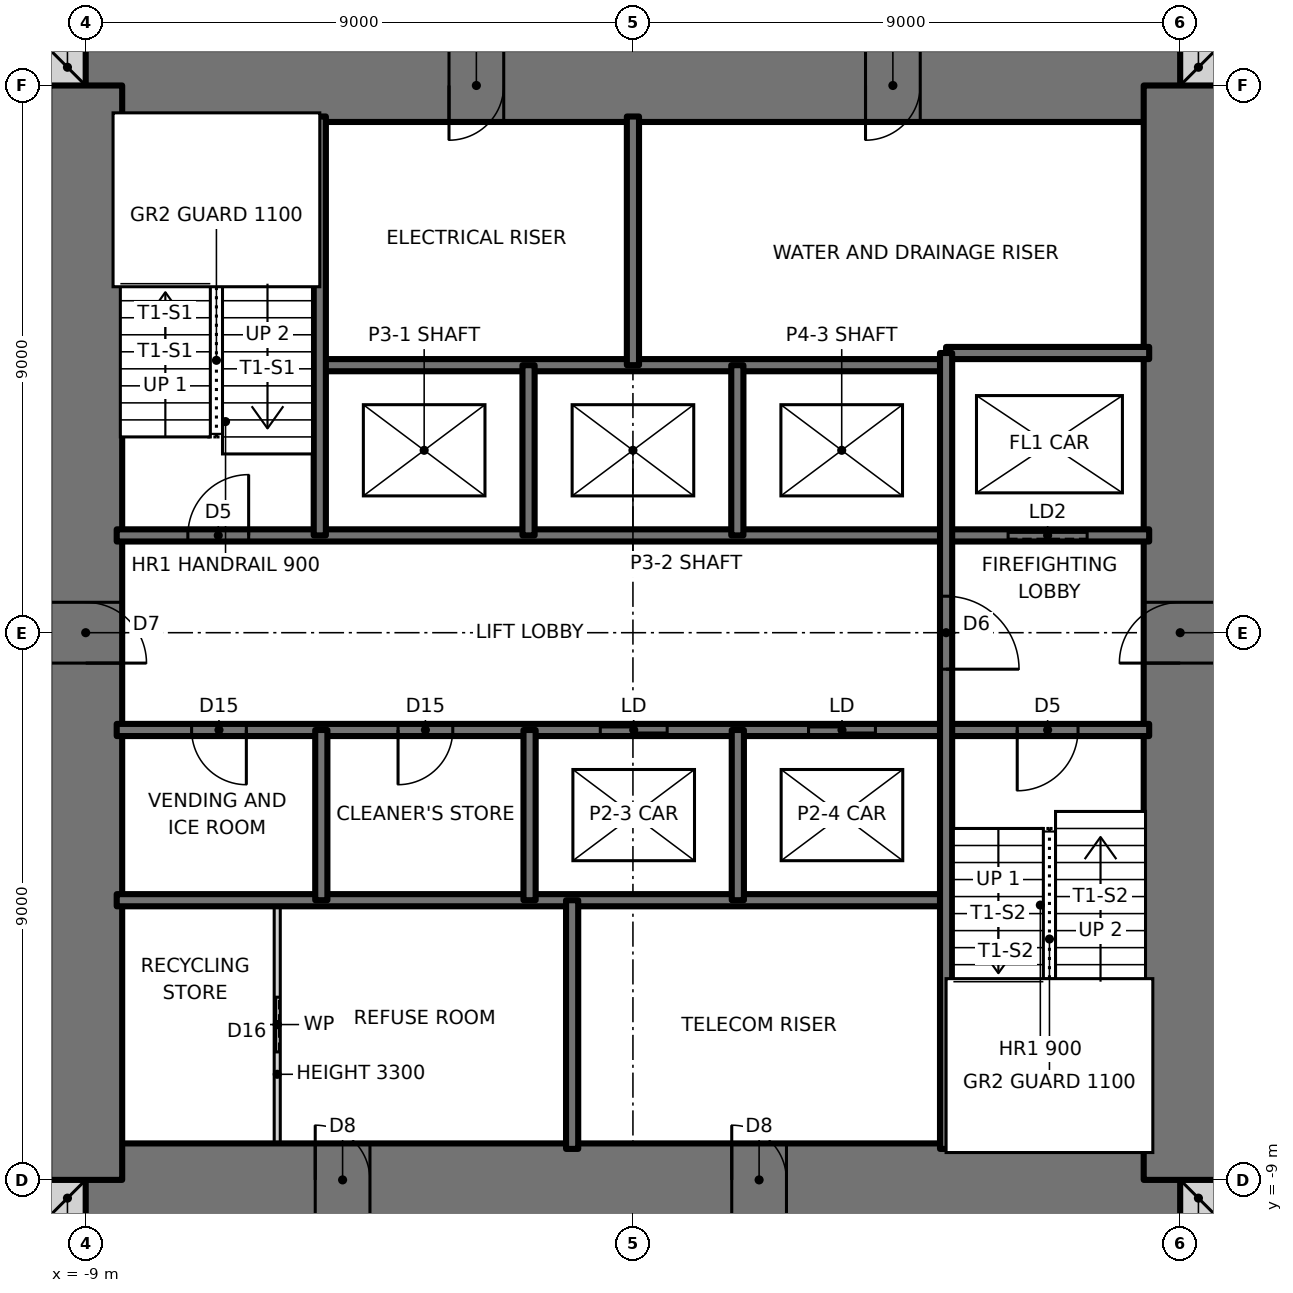
"""IFC4 building model, lengths in metres.
Left out: names, types, materials, properties, quantities, classifications, styles, units other than length and angle.
Written with IfcOpenShell. Run it as: python <this file> out.ifc"""

import sys

from ifc_helpers import new_model, si_unit, direction, frame, frame_2d, origin, place, context, subcontext, project, spatial, rectangle, extrude, element, fill, save


model = new_model("IFC4")
c1 = context("Model", 3, precision=1e-05, world=origin(), true_north=direction((0.0, 1.0)))
c2 = subcontext(c1, "Body", "Model", "MODEL_VIEW")
j1 = project(units=[si_unit("LENGTHUNIT", "METRE"), si_unit("PLANEANGLEUNIT", "RADIAN")], contexts=[c1])
p1 = place(None, origin())
s1 = spatial("IfcSite", under=j1, at=p1, CompositionType="ELEMENT")
p2 = place(p1, origin())
s2 = spatial("IfcBuilding", under=s1, at=p2, CompositionType="ELEMENT")
p3 = place(p2, frame((0.0, 0.0, 140.0)))
s3 = spatial("IfcBuildingStorey", under=s2, at=p3, CompositionType="ELEMENT", Elevation=140.0)
for number, where, z_axis, x_axis in (
    (1, (-9.6, -9.3, 0.0), (0.0, 0.0, 1.0), (1.0, 0.0, 0.0)),
    (2, (9.0, -9.3, 0.0), (0.0, 0.0, 1.0), (1.0, 0.0, 0.0)),
    (3, (9.0, 9.3, 0.0), (0.0, 0.0, 1.0), (1.0, 0.0, 0.0)),
    (4, (-9.6, 9.3, 0.0), (0.0, 0.0, 1.0), (1.0, 0.0, 0.0)),
):
    element("IfcWall", number, at=place(p3, frame(where, z_axis=z_axis, x_axis=x_axis)), inside=s3, PredefinedType="SOLIDWALL", context=c2, shape_type="SweptSolid", body=[
        extrude(rectangle(XDim=0.6, YDim=0.6, at=frame_2d((0.3, 0.0))), origin(), (0.0, 0.0, 1.0), 3.5),
    ])
p4 = place(p3, frame((-9.0, -9.0, 0.0), z_axis=(0.0, 0.0, 1.0), x_axis=(1.0, 0.0, 0.0)))
e5 = element("IfcWall", 5, at=p4, inside=s3, PredefinedType="SHEAR", context=c2, shape_type="SweptSolid", body=[
    extrude(rectangle(XDim=18.0, YDim=1.2, at=frame_2d((9.0, 0.0))), origin(), (0.0, 0.0, 1.0), 3.5),
])
p5 = place(p4, frame((3.775, 0.0, 0.0)))
e6 = element("IfcOpeningElement", 6, at=p5, cuts=e5, PredefinedType="OPENING", context=c2, shape_type="SweptSolid", body=[
    extrude(rectangle(XDim=0.9, YDim=2.1, at=frame_2d((0.45, 1.05))), frame((0.0, 0.61, 0.0), z_axis=(0.0, -1.0, 0.0), x_axis=(1.0, 0.0, 0.0)), (0.0, 0.0, 1.0), 1.22),
])
p6 = place(p4, frame((10.625, 0.0, 0.0)))
e7 = element("IfcOpeningElement", 7, at=p6, cuts=e5, PredefinedType="OPENING", context=c2, shape_type="SweptSolid", body=[
    extrude(rectangle(XDim=0.9, YDim=2.1, at=frame_2d((0.45, 1.05))), frame((0.0, 0.61, 0.0), z_axis=(0.0, -1.0, 0.0), x_axis=(1.0, 0.0, 0.0)), (0.0, 0.0, 1.0), 1.22),
])
p7 = place(p3, frame((9.0, 9.0, 0.0), z_axis=(0.0, 0.0, 1.0), x_axis=(-1.0, 0.0, 0.0)))
e8 = element("IfcWall", 8, at=p7, inside=s3, PredefinedType="SHEAR", context=c2, shape_type="SweptSolid", body=[
    extrude(rectangle(XDim=18.0, YDim=1.2, at=frame_2d((9.0, 0.0))), origin(), (0.0, 0.0, 1.0), 3.5),
])
p8 = place(p7, frame((11.125, 0.0, 0.0)))
e9 = element("IfcOpeningElement", 9, at=p8, cuts=e8, PredefinedType="OPENING", context=c2, shape_type="SweptSolid", body=[
    extrude(rectangle(XDim=0.9, YDim=2.1, at=frame_2d((0.45, 1.05))), frame((0.0, 0.61, 0.0), z_axis=(0.0, -1.0, 0.0), x_axis=(1.0, 0.0, 0.0)), (0.0, 0.0, 1.0), 1.22),
])
p9 = place(p7, frame((4.275, 0.0, 0.0)))
e10 = element("IfcOpeningElement", 10, at=p9, cuts=e8, PredefinedType="OPENING", context=c2, shape_type="SweptSolid", body=[
    extrude(rectangle(XDim=0.9, YDim=2.1, at=frame_2d((0.45, 1.05))), frame((0.0, 0.61, 0.0), z_axis=(0.0, -1.0, 0.0), x_axis=(1.0, 0.0, 0.0)), (0.0, 0.0, 1.0), 1.22),
])
p10 = place(p3, frame((9.0, -9.0, 0.0), z_axis=(0.0, 0.0, 1.0), x_axis=(0.0, 1.0, 0.0)))
e11 = element("IfcWall", 11, at=p10, inside=s3, PredefinedType="SHEAR", context=c2, shape_type="SweptSolid", body=[
    extrude(rectangle(XDim=18.0, YDim=1.2, at=frame_2d((9.0, 0.0))), origin(), (0.0, 0.0, 1.0), 3.5),
])
p11 = place(p10, frame((8.5, 0.0, 0.0)))
e12 = element("IfcOpeningElement", 12, at=p11, cuts=e11, PredefinedType="OPENING", context=c2, shape_type="SweptSolid", body=[
    extrude(rectangle(XDim=1.0, YDim=2.1, at=frame_2d((0.5, 1.05))), frame((0.0, 0.61, 0.0), z_axis=(0.0, -1.0, 0.0), x_axis=(1.0, 0.0, 0.0)), (0.0, 0.0, 1.0), 1.22),
])
p12 = place(p3, frame((-9.0, 9.0, 0.0), z_axis=(0.0, 0.0, 1.0), x_axis=(0.0, -1.0, 0.0)))
e13 = element("IfcWall", 13, at=p12, inside=s3, PredefinedType="SHEAR", context=c2, shape_type="SweptSolid", body=[
    extrude(rectangle(XDim=18.0, YDim=1.2, at=frame_2d((9.0, 0.0))), origin(), (0.0, 0.0, 1.0), 3.5),
])
p13 = place(p12, frame((8.5, 0.0, 0.0)))
e14 = element("IfcOpeningElement", 14, at=p13, cuts=e13, PredefinedType="OPENING", context=c2, shape_type="SweptSolid", body=[
    extrude(rectangle(XDim=1.0, YDim=2.1, at=frame_2d((0.5, 1.05))), frame((0.0, 0.61, 0.0), z_axis=(0.0, -1.0, 0.0), x_axis=(1.0, 0.0, 0.0)), (0.0, 0.0, 1.0), 1.22),
])
p14 = place(p3, frame((-8.49, -4.4, 0.0), z_axis=(0.0, 0.0, 1.0), x_axis=(1.0, 0.0, 0.0)))
e15 = element("IfcWall", 15, at=p14, inside=s3, PredefinedType="SOLIDWALL", context=c2, shape_type="SweptSolid", body=[
    extrude(rectangle(XDim=13.64, YDim=0.2, at=frame_2d((6.82, 0.0))), origin(), (0.0, 0.0, 1.0), 3.5),
])
p15 = place(p3, frame((-8.49, -1.6, 0.0), z_axis=(0.0, 0.0, 1.0), x_axis=(1.0, 0.0, 0.0)))
e16 = element("IfcWall", 16, at=p15, inside=s3, PredefinedType="SOLIDWALL", context=c2, shape_type="SweptSolid", body=[
    extrude(rectangle(XDim=16.98, YDim=0.2, at=frame_2d((8.49, 0.0))), origin(), (0.0, 0.0, 1.0), 3.5),
])
p16 = place(p15, frame((14.81, 0.0, 0.0)))
e17 = element("IfcOpeningElement", 17, at=p16, cuts=e16, PredefinedType="OPENING", context=c2, shape_type="SweptSolid", body=[
    extrude(rectangle(XDim=1.0, YDim=2.1, at=frame_2d((0.5, 1.05))), frame((0.0, 0.11, 0.0), z_axis=(0.0, -1.0, 0.0), x_axis=(1.0, 0.0, 0.0)), (0.0, 0.0, 1.0), 0.22),
])
p17 = place(p15, frame((1.232, 0.0, 0.0)))
e18 = element("IfcOpeningElement", 18, at=p17, cuts=e16, PredefinedType="OPENING", context=c2, shape_type="SweptSolid", body=[
    extrude(rectangle(XDim=0.9, YDim=2.1, at=frame_2d((0.45, 1.05))), frame((0.0, 0.11, 0.0), z_axis=(0.0, -1.0, 0.0), x_axis=(1.0, 0.0, 0.0)), (0.0, 0.0, 1.0), 0.22),
])
p18 = place(p15, frame((4.627, 0.0, 0.0)))
e19 = element("IfcOpeningElement", 19, at=p18, cuts=e16, PredefinedType="OPENING", context=c2, shape_type="SweptSolid", body=[
    extrude(rectangle(XDim=0.9, YDim=2.1, at=frame_2d((0.45, 1.05))), frame((0.0, 0.11, 0.0), z_axis=(0.0, -1.0, 0.0), x_axis=(1.0, 0.0, 0.0)), (0.0, 0.0, 1.0), 0.22),
])
p19 = place(p15, frame((7.953, 0.0, 0.0)))
e20 = element("IfcOpeningElement", 20, at=p19, cuts=e16, PredefinedType="OPENING", context=c2, shape_type="SweptSolid", body=[
    extrude(rectangle(XDim=1.1, YDim=2.1, at=frame_2d((0.55, 1.05))), frame((0.0, 0.11, 0.0), z_axis=(0.0, -1.0, 0.0), x_axis=(1.0, 0.0, 0.0)), (0.0, 0.0, 1.0), 0.22),
])
p20 = place(p15, frame((11.378, 0.0, 0.0)))
e21 = element("IfcOpeningElement", 21, at=p20, cuts=e16, PredefinedType="OPENING", context=c2, shape_type="SweptSolid", body=[
    extrude(rectangle(XDim=1.1, YDim=2.1, at=frame_2d((0.55, 1.05))), frame((0.0, 0.11, 0.0), z_axis=(0.0, -1.0, 0.0), x_axis=(1.0, 0.0, 0.0)), (0.0, 0.0, 1.0), 0.22),
])
p21 = place(p3, frame((-8.49, 1.6, 0.0), z_axis=(0.0, 0.0, 1.0), x_axis=(1.0, 0.0, 0.0)))
e22 = element("IfcWall", 22, at=p21, inside=s3, PredefinedType="SOLIDWALL", context=c2, shape_type="SweptSolid", body=[
    extrude(rectangle(XDim=16.98, YDim=0.2, at=frame_2d((8.49, 0.0))), origin(), (0.0, 0.0, 1.0), 3.5),
])
p22 = place(p21, frame((1.17, 0.0, 0.0)))
e23 = element("IfcOpeningElement", 23, at=p22, cuts=e22, PredefinedType="OPENING", context=c2, shape_type="SweptSolid", body=[
    extrude(rectangle(XDim=1.0, YDim=2.1, at=frame_2d((0.5, 1.05))), frame((0.0, 0.11, 0.0), z_axis=(0.0, -1.0, 0.0), x_axis=(1.0, 0.0, 0.0)), (0.0, 0.0, 1.0), 0.22),
])
p23 = place(p21, frame((14.66, 0.0, 0.0)))
e24 = element("IfcOpeningElement", 24, at=p23, cuts=e22, PredefinedType="OPENING", context=c2, shape_type="SweptSolid", body=[
    extrude(rectangle(XDim=1.3, YDim=2.1, at=frame_2d((0.65, 1.05))), frame((0.0, 0.11, 0.0), z_axis=(0.0, -1.0, 0.0), x_axis=(1.0, 0.0, 0.0)), (0.0, 0.0, 1.0), 0.22),
])
p24 = place(p3, frame((-5.15, 4.4, 0.0), z_axis=(0.0, 0.0, 1.0), x_axis=(1.0, 0.0, 0.0)))
e25 = element("IfcWall", 25, at=p24, inside=s3, PredefinedType="SOLIDWALL", context=c2, shape_type="SweptSolid", body=[
    extrude(rectangle(XDim=10.3, YDim=0.2, at=frame_2d((5.15, 0.0))), origin(), (0.0, 0.0, 1.0), 3.5),
])
p25 = place(p3, frame((5.15, 4.6, 0.0), z_axis=(0.0, 0.0, 1.0), x_axis=(1.0, 0.0, 0.0)))
e26 = element("IfcWall", 26, at=p25, inside=s3, PredefinedType="SOLIDWALL", context=c2, shape_type="SweptSolid", body=[
    extrude(rectangle(XDim=3.34, YDim=0.2, at=frame_2d((1.67, 0.0))), origin(), (0.0, 0.0, 1.0), 3.5),
])
p26 = place(p3, frame((5.15, -8.49, 0.0), z_axis=(0.0, 0.0, 1.0), x_axis=(0.0, 1.0, 0.0)))
e27 = element("IfcWall", 27, at=p26, inside=s3, PredefinedType="SOLIDWALL", context=c2, shape_type="SweptSolid", body=[
    extrude(rectangle(XDim=13.09, YDim=0.2, at=frame_2d((6.545, 0.0))), origin(), (0.0, 0.0, 1.0), 3.5),
])
p27 = place(p26, frame((7.89, 0.0, 0.0)))
e28 = element("IfcOpeningElement", 28, at=p27, cuts=e27, PredefinedType="OPENING", context=c2, shape_type="SweptSolid", body=[
    extrude(rectangle(XDim=1.2, YDim=2.1, at=frame_2d((0.6, 1.05))), frame((0.0, 0.11, 0.0), z_axis=(0.0, -1.0, 0.0), x_axis=(1.0, 0.0, 0.0)), (0.0, 0.0, 1.0), 0.22),
])
for number, where, z_axis, x_axis in (
    (29, (1.725, -4.4, 0.0), (0.0, 0.0, 1.0), (0.0, 1.0, 0.0)),
    (30, (1.717, 1.6, 0.0), (0.0, 0.0, 1.0), (0.0, 1.0, 0.0)),
):
    element("IfcWall", number, at=place(p3, frame(where, z_axis=z_axis, x_axis=x_axis)), inside=s3, PredefinedType="SOLIDWALL", context=c2, shape_type="SweptSolid", body=[
        extrude(rectangle(XDim=2.8, YDim=0.2, at=frame_2d((1.4, 0.0))), origin(), (0.0, 0.0, 1.0), 3.5),
    ])
for number, where, z_axis, x_axis in (
    (31, (0.0, 4.4, 0.0), (0.0, 0.0, 1.0), (0.0, 1.0, 0.0)),
    (32, (-1.0, -8.49, 0.0), (0.0, 0.0, 1.0), (0.0, 1.0, 0.0)),
):
    element("IfcWall", number, at=place(p3, frame(where, z_axis=z_axis, x_axis=x_axis)), inside=s3, PredefinedType="SOLIDWALL", context=c2, shape_type="SweptSolid", body=[
        extrude(rectangle(XDim=4.09, YDim=0.2, at=frame_2d((2.045, 0.0))), origin(), (0.0, 0.0, 1.0), 3.5),
    ])
for number, where, z_axis, x_axis in (
    (33, (-1.7, -4.4, 0.0), (0.0, 0.0, 1.0), (0.0, 1.0, 0.0)),
    (34, (-1.717, 1.6, 0.0), (0.0, 0.0, 1.0), (0.0, 1.0, 0.0)),
    (35, (-5.125, -4.4, 0.0), (0.0, 0.0, 1.0), (0.0, 1.0, 0.0)),
):
    element("IfcWall", number, at=place(p3, frame(where, z_axis=z_axis, x_axis=x_axis)), inside=s3, PredefinedType="SOLIDWALL", context=c2, shape_type="SweptSolid", body=[
        extrude(rectangle(XDim=2.8, YDim=0.2, at=frame_2d((1.4, 0.0))), origin(), (0.0, 0.0, 1.0), 3.5),
    ])
p28 = place(p3, frame((-5.15, 1.6, 0.0), z_axis=(0.0, 0.0, 1.0), x_axis=(0.0, 1.0, 0.0)))
e36 = element("IfcWall", 36, at=p28, inside=s3, PredefinedType="SOLIDWALL", context=c2, shape_type="SweptSolid", body=[
    extrude(rectangle(XDim=6.89, YDim=0.2, at=frame_2d((3.445, 0.0))), origin(), (0.0, 0.0, 1.0), 3.5),
])
p29 = place(p3, frame((-5.85, -8.49, 0.0), z_axis=(0.0, 0.0, 1.0), x_axis=(0.0, 1.0, 0.0)))
e37 = element("IfcWall", 37, at=p29, inside=s3, PredefinedType="PARTITIONING", context=c2, shape_type="SweptSolid", body=[
    extrude(rectangle(XDim=4.09, YDim=0.1, at=frame_2d((2.045, 0.0))), origin(), (0.0, 0.0, 1.0), 3.3),
])
p30 = place(p29, frame((1.595, 0.0, 0.0)))
e38 = element("IfcOpeningElement", 38, at=p30, cuts=e37, PredefinedType="OPENING", context=c2, shape_type="SweptSolid", body=[
    extrude(rectangle(XDim=0.9, YDim=2.1, at=frame_2d((0.45, 1.05))), frame((0.0, 0.06, 0.0), z_axis=(0.0, -1.0, 0.0), x_axis=(1.0, 0.0, 0.0)), (0.0, 0.0, 1.0), 0.12),
])
p31 = place(p22, origin())
e39 = element("IfcDoor", 39, at=p31, inside=s3, OperationType="SINGLE_SWING_RIGHT", PredefinedType="DOOR", context=c2, shape_type="SweptSolid", body=[
    extrude(rectangle(XDim=1.0, YDim=2.1, at=frame_2d((0.5, 1.05))), frame((0.0, 0.025, 0.0), z_axis=(0.0, -1.0, 0.0), x_axis=(1.0, 0.0, 0.0)), (0.0, 0.0, 1.0), 0.05),
])
fill(e23, e39)
p32 = place(p16, frame((1.0, 0.0, 0.0), z_axis=(0.0, 0.0, 1.0), x_axis=(-1.0, 0.0, 0.0)))
e40 = element("IfcDoor", 40, at=p32, inside=s3, OperationType="SINGLE_SWING_RIGHT", PredefinedType="DOOR", context=c2, shape_type="SweptSolid", body=[
    extrude(rectangle(XDim=1.0, YDim=2.1, at=frame_2d((0.5, 1.05))), frame((0.0, 0.025, 0.0), z_axis=(0.0, -1.0, 0.0), x_axis=(1.0, 0.0, 0.0)), (0.0, 0.0, 1.0), 0.05),
])
fill(e17, e40)
p33 = place(p27, frame((1.2, 0.0, 0.0), z_axis=(0.0, 0.0, 1.0), x_axis=(-1.0, 0.0, 0.0)))
e41 = element("IfcDoor", 41, at=p33, inside=s3, OperationType="SINGLE_SWING_RIGHT", PredefinedType="DOOR", context=c2, shape_type="SweptSolid", body=[
    extrude(rectangle(XDim=1.2, YDim=2.1, at=frame_2d((0.6, 1.05))), frame((0.0, 0.025, 0.0), z_axis=(0.0, -1.0, 0.0), x_axis=(1.0, 0.0, 0.0)), (0.0, 0.0, 1.0), 0.05),
])
fill(e28, e41)
p34 = place(p17, frame((0.9, 0.0, 0.0), z_axis=(0.0, 0.0, 1.0), x_axis=(-1.0, 0.0, 0.0)))
e42 = element("IfcDoor", 42, at=p34, inside=s3, OperationType="SINGLE_SWING_LEFT", PredefinedType="DOOR", context=c2, shape_type="SweptSolid", body=[
    extrude(rectangle(XDim=0.9, YDim=2.1, at=frame_2d((0.45, 1.05))), frame((0.0, 0.025, 0.0), z_axis=(0.0, -1.0, 0.0), x_axis=(1.0, 0.0, 0.0)), (0.0, 0.0, 1.0), 0.05),
])
fill(e18, e42)
p35 = place(p18, frame((0.9, 0.0, 0.0), z_axis=(0.0, 0.0, 1.0), x_axis=(-1.0, 0.0, 0.0)))
e43 = element("IfcDoor", 43, at=p35, inside=s3, OperationType="SINGLE_SWING_RIGHT", PredefinedType="DOOR", context=c2, shape_type="SweptSolid", body=[
    extrude(rectangle(XDim=0.9, YDim=2.1, at=frame_2d((0.45, 1.05))), frame((0.0, 0.025, 0.0), z_axis=(0.0, -1.0, 0.0), x_axis=(1.0, 0.0, 0.0)), (0.0, 0.0, 1.0), 0.05),
])
fill(e19, e43)
p36 = place(p30, origin())
e44 = element("IfcDoor", 44, at=p36, inside=s3, OperationType="SLIDING_TO_LEFT", PredefinedType="DOOR", context=c2, shape_type="SweptSolid", body=[
    extrude(rectangle(XDim=0.9, YDim=2.1, at=frame_2d((0.45, 1.05))), frame((0.0, 0.025, 0.0), z_axis=(0.0, -1.0, 0.0), x_axis=(1.0, 0.0, 0.0)), (0.0, 0.0, 1.0), 0.05),
])
fill(e38, e44)
p37 = place(p13, origin())
e45 = element("IfcDoor", 45, at=p37, inside=s3, OperationType="SINGLE_SWING_RIGHT", PredefinedType="DOOR", context=c2, shape_type="SweptSolid", body=[
    extrude(rectangle(XDim=1.0, YDim=2.1, at=frame_2d((0.5, 1.05))), frame((0.0, 0.025, 0.0), z_axis=(0.0, -1.0, 0.0), x_axis=(1.0, 0.0, 0.0)), (0.0, 0.0, 1.0), 0.05),
])
fill(e14, e45)
p38 = place(p11, origin())
e46 = element("IfcDoor", 46, at=p38, inside=s3, OperationType="SINGLE_SWING_LEFT", PredefinedType="DOOR", context=c2, shape_type="SweptSolid", body=[
    extrude(rectangle(XDim=1.0, YDim=2.1, at=frame_2d((0.5, 1.05))), frame((0.0, 0.025, 0.0), z_axis=(0.0, -1.0, 0.0), x_axis=(1.0, 0.0, 0.0)), (0.0, 0.0, 1.0), 0.05),
])
fill(e12, e46)
p39 = place(p8, origin())
e47 = element("IfcDoor", 47, at=p39, inside=s3, OperationType="SINGLE_SWING_RIGHT", PredefinedType="DOOR", context=c2, shape_type="SweptSolid", body=[
    extrude(rectangle(XDim=0.9, YDim=2.1, at=frame_2d((0.45, 1.05))), frame((0.0, 0.025, 0.0), z_axis=(0.0, -1.0, 0.0), x_axis=(1.0, 0.0, 0.0)), (0.0, 0.0, 1.0), 0.05),
])
fill(e9, e47)
p40 = place(p9, origin())
e48 = element("IfcDoor", 48, at=p40, inside=s3, OperationType="SINGLE_SWING_RIGHT", PredefinedType="DOOR", context=c2, shape_type="SweptSolid", body=[
    extrude(rectangle(XDim=0.9, YDim=2.1, at=frame_2d((0.45, 1.05))), frame((0.0, 0.025, 0.0), z_axis=(0.0, -1.0, 0.0), x_axis=(1.0, 0.0, 0.0)), (0.0, 0.0, 1.0), 0.05),
])
fill(e10, e48)
p41 = place(p5, origin())
e49 = element("IfcDoor", 49, at=p41, inside=s3, OperationType="SINGLE_SWING_LEFT", PredefinedType="DOOR", context=c2, shape_type="SweptSolid", body=[
    extrude(rectangle(XDim=0.9, YDim=2.1, at=frame_2d((0.45, 1.05))), frame((0.0, 0.025, 0.0), z_axis=(0.0, -1.0, 0.0), x_axis=(1.0, 0.0, 0.0)), (0.0, 0.0, 1.0), 0.05),
])
fill(e6, e49)
p42 = place(p6, origin())
e50 = element("IfcDoor", 50, at=p42, inside=s3, OperationType="SINGLE_SWING_LEFT", PredefinedType="DOOR", context=c2, shape_type="SweptSolid", body=[
    extrude(rectangle(XDim=0.9, YDim=2.1, at=frame_2d((0.45, 1.05))), frame((0.0, 0.025, 0.0), z_axis=(0.0, -1.0, 0.0), x_axis=(1.0, 0.0, 0.0)), (0.0, 0.0, 1.0), 0.05),
])
fill(e7, e50)
p43 = place(p19, origin())
e51 = element("IfcDoor", 51, at=p43, inside=s3, OperationType="DOUBLE_DOOR_SLIDING", PredefinedType="DOOR", context=c2, shape_type="SweptSolid", body=[
    extrude(rectangle(XDim=1.1, YDim=2.1, at=frame_2d((0.55, 1.05))), frame((0.0, 0.025, 0.0), z_axis=(0.0, -1.0, 0.0), x_axis=(1.0, 0.0, 0.0)), (0.0, 0.0, 1.0), 0.05),
])
fill(e20, e51)
p44 = place(p20, origin())
e52 = element("IfcDoor", 52, at=p44, inside=s3, OperationType="DOUBLE_DOOR_SLIDING", PredefinedType="DOOR", context=c2, shape_type="SweptSolid", body=[
    extrude(rectangle(XDim=1.1, YDim=2.1, at=frame_2d((0.55, 1.05))), frame((0.0, 0.025, 0.0), z_axis=(0.0, -1.0, 0.0), x_axis=(1.0, 0.0, 0.0)), (0.0, 0.0, 1.0), 0.05),
])
fill(e21, e52)
p45 = place(p23, origin())
e53 = element("IfcDoor", 53, at=p45, inside=s3, OperationType="SLIDING_TO_LEFT", PredefinedType="DOOR", context=c2, shape_type="SweptSolid", body=[
    extrude(rectangle(XDim=1.3, YDim=2.1, at=frame_2d((0.65, 1.05))), frame((0.0, 0.025, 0.0), z_axis=(0.0, -1.0, 0.0), x_axis=(1.0, 0.0, 0.0)), (0.0, 0.0, 1.0), 0.05),
])
fill(e24, e53)
save(model, sys.argv[1])
